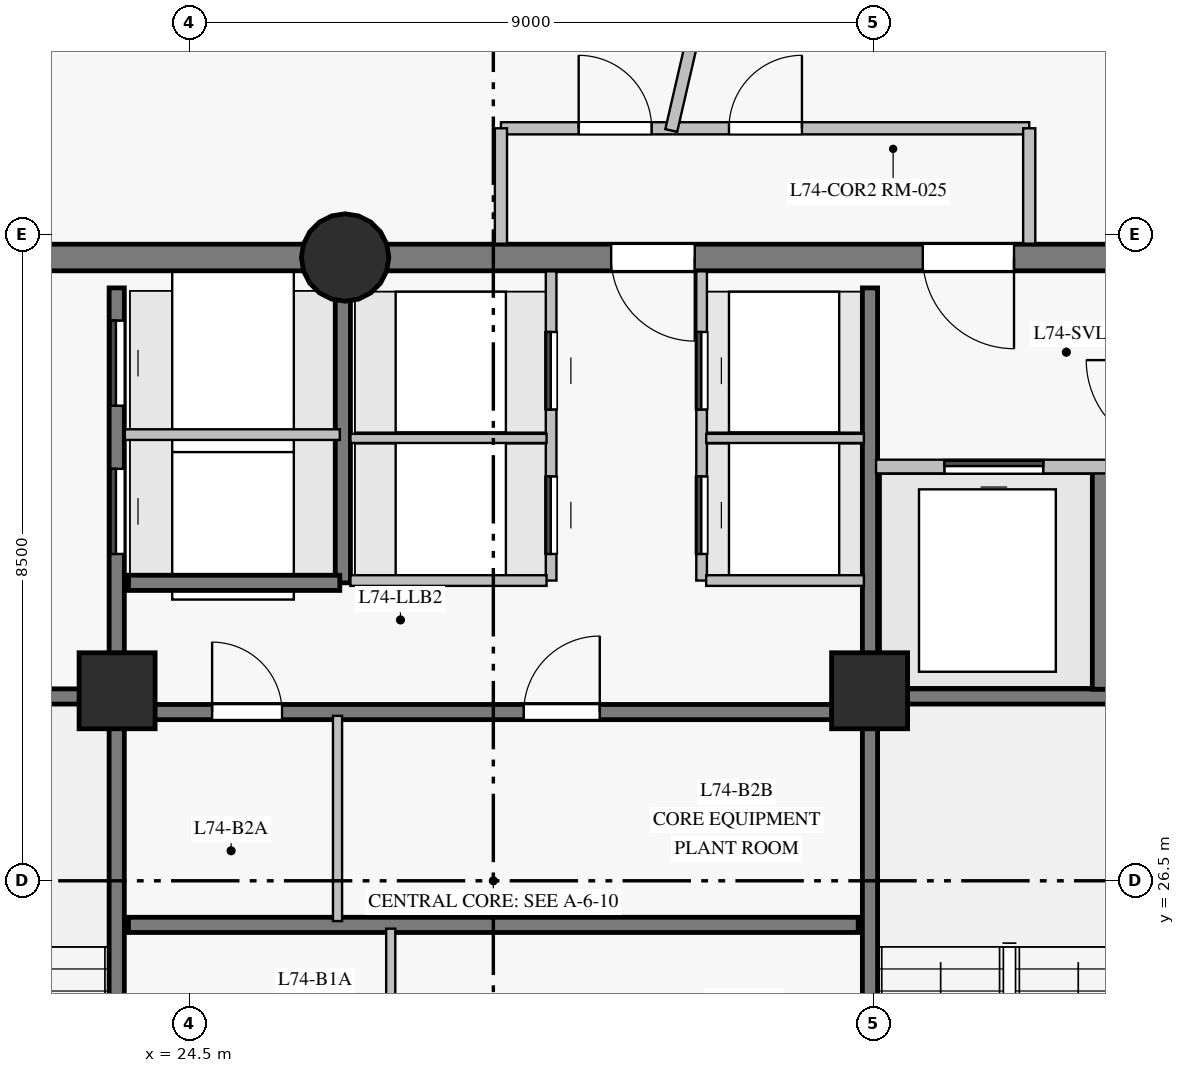
"""IFC4 building model, lengths in metres.
Left out: names, types, materials, properties, quantities, classifications, styles, units other than length and angle.
Written with IfcOpenShell. Run it as: python <this file> out.ifc"""

import sys

from ifc_helpers import new_model, si_unit, direction, frame, frame_2d, origin, origin_with_axes, origin_2d, place, context, subcontext, project, spatial, rectangle, circle, extrude, source, transform, mapped, element, fill, save


model = new_model("IFC4")
c1 = context("Model", 3, precision=1e-05, world=origin(), true_north=direction((0.0, 1.0)))
c2 = subcontext(c1, "Body", "Model", "MODEL_VIEW")
j1 = project(units=[si_unit("LENGTHUNIT", "METRE"), si_unit("PLANEANGLEUNIT", "RADIAN")], contexts=[c1])
p1 = place(None, origin())
s1 = spatial("IfcSite", under=j1, at=p1, CompositionType="ELEMENT")
p2 = place(p1, origin())
s2 = spatial("IfcBuilding", under=s1, at=p2, CompositionType="ELEMENT")
p3 = place(p2, frame((0.0, 0.0, 250.45)))
s3 = spatial("IfcBuildingStorey", under=s2, at=p3, CompositionType="ELEMENT", Elevation=250.45)
p4 = place(p3, frame((37.5, 34.7, 0.0), z_axis=(0.0, 0.0, 1.0), x_axis=(-1.0, 0.0, 0.0)))
e1 = element("IfcWall", 1, at=p4, inside=s3, PredefinedType="SHEAR", context=c2, shape_type="SweptSolid", body=[
    extrude(rectangle(XDim=10.95, YDim=0.35, at=frame_2d((5.475, 0.0))), origin(), (0.0, 0.0, 1.0), 2.85),
])
p5 = place(p4, frame((2.15, 0.0, 0.0)))
e2 = element("IfcOpeningElement", 2, at=p5, cuts=e1, PredefinedType="OPENING", context=c2, shape_type="SweptSolid", body=[
    extrude(rectangle(XDim=1.2, YDim=2.15, at=frame_2d((0.6, 1.075))), frame((0.0, 0.185, 0.0), z_axis=(0.0, -1.0, 0.0), x_axis=(1.0, 0.0, 0.0)), (0.0, 0.0, 1.0), 0.37),
])
p6 = place(p4, frame((6.35, 0.0, 0.0)))
e3 = element("IfcOpeningElement", 3, at=p6, cuts=e1, PredefinedType="OPENING", context=c2, shape_type="SweptSolid", body=[
    extrude(rectangle(XDim=1.1, YDim=2.15, at=frame_2d((0.55, 1.075))), frame((0.0, 0.185, 0.0), z_axis=(0.0, -1.0, 0.0), x_axis=(1.0, 0.0, 0.0)), (0.0, 0.0, 1.0), 0.37),
])
p7 = place(p3, frame((26.55, 34.7, 0.0), z_axis=(0.0, 0.0, 1.0), x_axis=(-1.0, 0.0, 0.0)))
e4 = element("IfcWall", 4, at=p7, inside=s3, PredefinedType="SHEAR", context=c2, shape_type="SweptSolid", body=[
    extrude(rectangle(XDim=7.05, YDim=0.35, at=frame_2d((3.525, 0.0))), origin(), (0.0, 0.0, 1.0), 2.85),
])
m1 = source(origin_with_axes(), c2, "Body", "SweptSolid", [
    extrude(circle(Radius=0.575, at=origin_2d()), origin(), (0.0, 0.0, 1.0), 3.05),
])
p8 = place(p3, frame((26.55, 34.7, 0.0), z_axis=(0.0, 0.0, 1.0), x_axis=(1.0, 0.0, 0.0)))
e5 = element("IfcColumn", 5, at=p8, inside=s3, PredefinedType="COLUMN", context=c2, shape_type="MappedRepresentation", body=[
    mapped(m1, transform((0.0, 0.0, 0.0), scale=1.0)),
])
m2 = source(origin_with_axes(), c2, "Body", "SweptSolid", [
    extrude(rectangle(XDim=1.0, YDim=1.0, at=origin_2d()), origin(), (0.0, 0.0, 1.0), 3.05),
])
for number, where, z_axis, x_axis in (
    (6, (23.55, 29.0, 0.0), (0.0, 0.0, 1.0), (1.0, 0.0, 0.0)),
    (7, (33.45, 29.0, 0.0), (0.0, 0.0, 1.0), (1.0, 0.0, 0.0)),
):
    element("IfcColumn", number, at=place(p3, frame(where, z_axis=z_axis, x_axis=x_axis)), inside=s3, PredefinedType="COLUMN", context=c2, shape_type="MappedRepresentation", body=[
        mapped(m2, transform((0.0, 0.0, 0.0), scale=1.0)),
    ])
p9 = place(p3, frame((23.545, 18.7, 0.0), z_axis=(0.0, 0.0, 1.0), x_axis=(0.0, 1.0, 0.0)))
e8 = element("IfcWall", 8, at=p9, inside=s3, PredefinedType="SHEAR", context=c2, shape_type="SweptSolid", body=[
    extrude(rectangle(XDim=15.6, YDim=0.2, at=frame_2d((7.8, 0.0))), origin(), (0.0, 0.0, 1.0), 2.85),
])
p10 = place(p9, frame((2.75, 0.0, 0.0)))
e9 = element("IfcOpeningElement", 9, at=p10, cuts=e8, PredefinedType="OPENING", context=c2, shape_type="SweptSolid", body=[
    extrude(rectangle(XDim=1.15, YDim=2.15, at=frame_2d((0.575, 1.075))), frame((0.0, 0.11, 0.0), z_axis=(0.0, -1.0, 0.0), x_axis=(1.0, 0.0, 0.0)), (0.0, 0.0, 1.0), 0.22),
])
p11 = place(p9, frame((0.14, 0.0, 0.0)))
e10 = element("IfcOpeningElement", 10, at=p11, cuts=e8, PredefinedType="OPENING", context=c2, shape_type="SweptSolid", body=[
    extrude(rectangle(XDim=0.88, YDim=2.1, at=frame_2d((0.44, 1.05))), frame((0.0, 0.11, 0.0), z_axis=(0.0, -1.0, 0.0), x_axis=(1.0, 0.0, 0.0)), (0.0, 0.0, 1.0), 0.22),
])
p12 = place(p9, frame((1.36, 0.0, 0.0)))
e11 = element("IfcOpeningElement", 11, at=p12, cuts=e8, PredefinedType="OPENING", context=c2, shape_type="SweptSolid", body=[
    extrude(rectangle(XDim=0.88, YDim=2.1, at=frame_2d((0.44, 1.05))), frame((0.0, 0.11, 0.0), z_axis=(0.0, -1.0, 0.0), x_axis=(1.0, 0.0, 0.0)), (0.0, 0.0, 1.0), 0.22),
])
p13 = place(p9, frame((12.1, 0.0, 0.0)))
e12 = element("IfcOpeningElement", 12, at=p13, cuts=e8, PredefinedType="OPENING", context=c2, shape_type="SweptSolid", body=[
    extrude(rectangle(XDim=1.12, YDim=2.15, at=frame_2d((0.56, 1.075))), frame((0.0, 0.11, 0.0), z_axis=(0.0, -1.0, 0.0), x_axis=(1.0, 0.0, 0.0)), (0.0, 0.0, 1.0), 0.22),
])
p14 = place(p9, frame((14.05, 0.0, 0.0)))
e13 = element("IfcOpeningElement", 13, at=p14, cuts=e8, PredefinedType="OPENING", context=c2, shape_type="SweptSolid", body=[
    extrude(rectangle(XDim=1.12, YDim=2.15, at=frame_2d((0.56, 1.075))), frame((0.0, 0.11, 0.0), z_axis=(0.0, -1.0, 0.0), x_axis=(1.0, 0.0, 0.0)), (0.0, 0.0, 1.0), 0.22),
])
p15 = place(p3, frame((33.455, 18.7, 0.0), z_axis=(0.0, 0.0, 1.0), x_axis=(0.0, 1.0, 0.0)))
e14 = element("IfcWall", 14, at=p15, inside=s3, PredefinedType="SHEAR", context=c2, shape_type="SweptSolid", body=[
    extrude(rectangle(XDim=15.6, YDim=0.2, at=frame_2d((7.8, 0.0))), origin(), (0.0, 0.0, 1.0), 2.85),
])
p16 = place(p15, frame((2.75, 0.0, 0.0)))
e15 = element("IfcOpeningElement", 15, at=p16, cuts=e14, PredefinedType="OPENING", context=c2, shape_type="SweptSolid", body=[
    extrude(rectangle(XDim=1.15, YDim=2.15, at=frame_2d((0.575, 1.075))), frame((0.0, 0.11, 0.0), z_axis=(0.0, -1.0, 0.0), x_axis=(1.0, 0.0, 0.0)), (0.0, 0.0, 1.0), 0.22),
])
p17 = place(p15, frame((0.55, 0.0, 0.0)))
e16 = element("IfcOpeningElement", 16, at=p17, cuts=e14, PredefinedType="OPENING", context=c2, shape_type="SweptSolid", body=[
    extrude(rectangle(XDim=0.94, YDim=2.1, at=frame_2d((0.47, 1.05))), frame((0.0, 0.11, 0.0), z_axis=(0.0, -1.0, 0.0), x_axis=(1.0, 0.0, 0.0)), (0.0, 0.0, 1.0), 0.22),
])
p18 = place(p3, frame((23.7, 25.92, 0.0), z_axis=(0.0, 0.0, 1.0), x_axis=(1.0, 0.0, 0.0)))
e17 = element("IfcWall", 17, at=p18, inside=s3, PredefinedType="SHEAR", context=c2, shape_type="SweptSolid", body=[
    extrude(rectangle(XDim=9.6, YDim=0.2, at=frame_2d((4.8, 0.0))), origin(), (0.0, 0.0, 1.0), 2.85),
])
p19 = place(p3, frame((23.7, 28.72, 0.0), z_axis=(0.0, 0.0, 1.0), x_axis=(1.0, 0.0, 0.0)))
e18 = element("IfcWall", 18, at=p19, inside=s3, PredefinedType="SHEAR", context=c2, shape_type="SweptSolid", body=[
    extrude(rectangle(XDim=9.6, YDim=0.2, at=frame_2d((4.8, 0.0))), origin(), (0.0, 0.0, 1.0), 2.85),
])
p20 = place(p19, frame((1.1, 0.0, 0.0)))
e19 = element("IfcOpeningElement", 19, at=p20, cuts=e18, PredefinedType="OPENING", context=c2, shape_type="SweptSolid", body=[
    extrude(rectangle(XDim=0.92, YDim=2.1, at=frame_2d((0.46, 1.05))), frame((0.0, 0.11, 0.0), z_axis=(0.0, -1.0, 0.0), x_axis=(1.0, 0.0, 0.0)), (0.0, 0.0, 1.0), 0.22),
])
p21 = place(p19, frame((5.2, 0.0, 0.0)))
e20 = element("IfcOpeningElement", 20, at=p21, cuts=e18, PredefinedType="OPENING", context=c2, shape_type="SweptSolid", body=[
    extrude(rectangle(XDim=1.0, YDim=2.15, at=frame_2d((0.5, 1.075))), frame((0.0, 0.11, 0.0), z_axis=(0.0, -1.0, 0.0), x_axis=(1.0, 0.0, 0.0)), (0.0, 0.0, 1.0), 0.22),
])
for number, where, z_axis, x_axis in (
    (21, (33.455, 28.925, 0.0), (0.0, 0.0, 1.0), (1.0, 0.0, 0.0)),
    (22, (19.55, 28.925, 0.0), (0.0, 0.0, 1.0), (1.0, 0.0, 0.0)),
):
    element("IfcWall", number, at=place(p3, frame(where, z_axis=z_axis, x_axis=x_axis)), inside=s3, PredefinedType="SHEAR", context=c2, shape_type="SweptSolid", body=[
        extrude(rectangle(XDim=3.995, YDim=0.2, at=frame_2d((1.998, 0.0))), origin(), (0.0, 0.0, 1.0), 2.85),
    ])
p22 = place(p3, frame((26.52, 30.42, 0.0), z_axis=(0.0, 0.0, 1.0), x_axis=(0.0, 1.0, 0.0)))
e23 = element("IfcWall", 23, at=p22, inside=s3, PredefinedType="SHEAR", context=c2, shape_type="SweptSolid", body=[
    extrude(rectangle(XDim=3.86, YDim=0.2, at=frame_2d((1.93, 0.0))), origin(), (0.0, 0.0, 1.0), 2.85),
])
p23 = place(p3, frame((36.48, 29.02, 0.0), z_axis=(0.0, 0.0, 1.0), x_axis=(0.0, 1.0, 0.0)))
e24 = element("IfcWall", 24, at=p23, inside=s3, PredefinedType="SHEAR", context=c2, shape_type="SweptSolid", body=[
    extrude(rectangle(XDim=2.86, YDim=0.2, at=frame_2d((1.43, 0.0))), origin(), (0.0, 0.0, 1.0), 2.85),
])
p24 = place(p3, frame((23.7, 30.42, 0.0), z_axis=(0.0, 0.0, 1.0), x_axis=(1.0, 0.0, 0.0)))
e25 = element("IfcWall", 25, at=p24, inside=s3, PredefinedType="SHEAR", context=c2, shape_type="SweptSolid", body=[
    extrude(rectangle(XDim=2.78, YDim=0.2, at=frame_2d((1.39, 0.0))), origin(), (0.0, 0.0, 1.0), 2.85),
])
p25 = place(p3, frame((28.6, 36.4, 0.0), z_axis=(0.0, 0.0, 1.0), x_axis=(1.0, 0.0, 0.0)))
e26 = element("IfcWall", 26, at=p25, inside=s3, PredefinedType="PARTITIONING", context=c2, shape_type="SweptSolid", body=[
    extrude(rectangle(XDim=6.95, YDim=0.16, at=frame_2d((3.475, 0.0))), origin(), (0.0, 0.0, 1.0), 2.45),
])
p26 = place(p25, frame((3.0, 0.0, 0.0)))
e27 = element("IfcOpeningElement", 27, at=p26, cuts=e26, PredefinedType="OPENING", context=c2, shape_type="SweptSolid", body=[
    extrude(rectangle(XDim=0.96, YDim=2.15, at=frame_2d((0.48, 1.075))), frame((0.0, 0.09, 0.0), z_axis=(0.0, -1.0, 0.0), x_axis=(1.0, 0.0, 0.0)), (0.0, 0.0, 1.0), 0.18),
])
p27 = place(p25, frame((1.022, 0.0, 0.0)))
e28 = element("IfcOpeningElement", 28, at=p27, cuts=e26, PredefinedType="OPENING", context=c2, shape_type="SweptSolid", body=[
    extrude(rectangle(XDim=0.96, YDim=2.15, at=frame_2d((0.48, 1.075))), frame((0.0, 0.09, 0.0), z_axis=(0.0, -1.0, 0.0), x_axis=(1.0, 0.0, 0.0)), (0.0, 0.0, 1.0), 0.18),
])
p28 = place(p3, frame((30.84, 36.371, 0.0), z_axis=(0.0, 0.0, 1.0), x_axis=(0.224990017286, 0.974361068661, 0.0)))
e29 = element("IfcWall", 29, at=p28, inside=s3, PredefinedType="PARTITIONING", context=c2, shape_type="SweptSolid", body=[
    extrude(rectangle(XDim=5.601, YDim=0.16, at=frame_2d((2.801, 0.0))), origin(), (0.0, 0.0, 1.0), 2.85),
])
p29 = place(p3, frame((29.26, 30.45, 0.0), z_axis=(0.0, 0.0, 1.0), x_axis=(0.0, 1.0, 0.0)))
e30 = element("IfcWall", 30, at=p29, inside=s3, PredefinedType="PARTITIONING", context=c2, shape_type="SweptSolid", body=[
    extrude(rectangle(XDim=4.068, YDim=0.14, at=frame_2d((2.034, 0.0))), origin(), (0.0, 0.0, 1.0), 2.85),
])
p30 = place(p29, frame((0.35, 0.0, 0.0)))
e31 = element("IfcOpeningElement", 31, at=p30, cuts=e30, PredefinedType="OPENING", context=c2, shape_type="SweptSolid", body=[
    extrude(rectangle(XDim=1.02, YDim=2.15, at=frame_2d((0.51, 1.075))), frame((0.0, 0.08, 0.0), z_axis=(0.0, -1.0, 0.0), x_axis=(1.0, 0.0, 0.0)), (0.0, 0.0, 1.0), 0.16),
])
p31 = place(p29, frame((2.25, 0.0, 0.0)))
e32 = element("IfcOpeningElement", 32, at=p31, cuts=e30, PredefinedType="OPENING", context=c2, shape_type="SweptSolid", body=[
    extrude(rectangle(XDim=1.02, YDim=2.15, at=frame_2d((0.51, 1.075))), frame((0.0, 0.08, 0.0), z_axis=(0.0, -1.0, 0.0), x_axis=(1.0, 0.0, 0.0)), (0.0, 0.0, 1.0), 0.16),
])
p32 = place(p3, frame((31.24, 30.45, 0.0), z_axis=(0.0, 0.0, 1.0), x_axis=(0.0, 1.0, 0.0)))
e33 = element("IfcWall", 33, at=p32, inside=s3, PredefinedType="PARTITIONING", context=c2, shape_type="SweptSolid", body=[
    extrude(rectangle(XDim=4.068, YDim=0.14, at=frame_2d((2.034, 0.0))), origin(), (0.0, 0.0, 1.0), 2.85),
])
p33 = place(p32, frame((0.35, 0.0, 0.0)))
e34 = element("IfcOpeningElement", 34, at=p33, cuts=e33, PredefinedType="OPENING", context=c2, shape_type="SweptSolid", body=[
    extrude(rectangle(XDim=1.02, YDim=2.15, at=frame_2d((0.51, 1.075))), frame((0.0, 0.08, 0.0), z_axis=(0.0, -1.0, 0.0), x_axis=(1.0, 0.0, 0.0)), (0.0, 0.0, 1.0), 0.16),
])
p34 = place(p32, frame((2.25, 0.0, 0.0)))
e35 = element("IfcOpeningElement", 35, at=p34, cuts=e33, PredefinedType="OPENING", context=c2, shape_type="SweptSolid", body=[
    extrude(rectangle(XDim=1.02, YDim=2.15, at=frame_2d((0.51, 1.075))), frame((0.0, 0.08, 0.0), z_axis=(0.0, -1.0, 0.0), x_axis=(1.0, 0.0, 0.0)), (0.0, 0.0, 1.0), 0.16),
])
p35 = place(p3, frame((33.535, 31.95, 0.0), z_axis=(0.0, 0.0, 1.0), x_axis=(1.0, 0.0, 0.0)))
e36 = element("IfcWall", 36, at=p35, inside=s3, PredefinedType="PARTITIONING", context=c2, shape_type="SweptSolid", body=[
    extrude(rectangle(XDim=3.784, YDim=0.18, at=frame_2d((1.892, 0.0))), origin(), (0.0, 0.0, 1.0), 2.85),
])
p36 = place(p35, frame((0.9, 0.0, 0.0)))
e37 = element("IfcOpeningElement", 37, at=p36, cuts=e36, PredefinedType="OPENING", context=c2, shape_type="SweptSolid", body=[
    extrude(rectangle(XDim=1.3, YDim=2.2, at=frame_2d((0.65, 1.1))), frame((0.0, 0.1, 0.0), z_axis=(0.0, -1.0, 0.0), x_axis=(1.0, 0.0, 0.0)), (0.0, 0.0, 1.0), 0.2),
])
p37 = place(p3, frame((23.652, 32.37, 0.0), z_axis=(0.0, 0.0, 1.0), x_axis=(1.0, 0.0, 0.0)))
e38 = element("IfcWall", 38, at=p37, inside=s3, PredefinedType="PARTITIONING", context=c2, shape_type="SweptSolid", body=[
    extrude(rectangle(XDim=2.828, YDim=0.14, at=frame_2d((1.414, 0.0))), origin(), (0.0, 0.0, 1.0), 2.85),
])
p38 = place(p3, frame((27.15, 23.17, 0.0), z_axis=(0.0, 0.0, 1.0), x_axis=(0.0, 1.0, 0.0)))
e39 = element("IfcWall", 39, at=p38, inside=s3, PredefinedType="PARTITIONING", context=c2, shape_type="SweptSolid", body=[
    extrude(rectangle(XDim=2.7, YDim=0.12, at=frame_2d((1.35, 0.0))), origin(), (0.0, 0.0, 1.0), 2.85),
])
p39 = place(p3, frame((26.45, 25.97, 0.0), z_axis=(0.0, 0.0, 1.0), x_axis=(0.0, 1.0, 0.0)))
e40 = element("IfcWall", 40, at=p39, inside=s3, PredefinedType="PARTITIONING", context=c2, shape_type="SweptSolid", body=[
    extrude(rectangle(XDim=2.7, YDim=0.12, at=frame_2d((1.35, 0.0))), origin(), (0.0, 0.0, 1.0), 2.85),
])
p40 = place(p3, frame((26.62, 30.45, 0.0), z_axis=(0.0, 0.0, 1.0), x_axis=(1.0, 0.0, 0.0)))
e41 = element("IfcWall", 41, at=p40, inside=s3, PredefinedType="PARTITIONING", context=c2, shape_type="SweptSolid", body=[
    extrude(rectangle(XDim=2.58, YDim=0.14, at=frame_2d((1.29, 0.0))), origin(), (0.0, 0.0, 1.0), 2.85),
])
p41 = place(p3, frame((26.62, 32.32, 0.0), z_axis=(0.0, 0.0, 1.0), x_axis=(1.0, 0.0, 0.0)))
e42 = element("IfcWall", 42, at=p41, inside=s3, PredefinedType="PARTITIONING", context=c2, shape_type="SweptSolid", body=[
    extrude(rectangle(XDim=2.58, YDim=0.12, at=frame_2d((1.29, 0.0))), origin(), (0.0, 0.0, 1.0), 2.85),
])
p42 = place(p3, frame((31.3, 30.45, 0.0), z_axis=(0.0, 0.0, 1.0), x_axis=(1.0, 0.0, 0.0)))
e43 = element("IfcWall", 43, at=p42, inside=s3, PredefinedType="PARTITIONING", context=c2, shape_type="SweptSolid", body=[
    extrude(rectangle(XDim=2.075, YDim=0.14, at=frame_2d((1.038, 0.0))), origin(), (0.0, 0.0, 1.0), 2.85),
])
p43 = place(p3, frame((31.3, 32.32, 0.0), z_axis=(0.0, 0.0, 1.0), x_axis=(1.0, 0.0, 0.0)))
e44 = element("IfcWall", 44, at=p43, inside=s3, PredefinedType="PARTITIONING", context=c2, shape_type="SweptSolid", body=[
    extrude(rectangle(XDim=2.075, YDim=0.12, at=frame_2d((1.038, 0.0))), origin(), (0.0, 0.0, 1.0), 2.85),
])
for number, where, z_axis, x_axis in (
    (45, (28.6, 34.882, 0.0), (0.0, 0.0, 1.0), (0.0, 1.0, 0.0)),
    (46, (35.55, 36.4, 0.0), (0.0, 0.0, 1.0), (0.0, -1.0, 0.0)),
):
    element("IfcWall", number, at=place(p3, frame(where, z_axis=z_axis, x_axis=x_axis)), inside=s3, PredefinedType="PARTITIONING", context=c2, shape_type="SweptSolid", body=[
        extrude(rectangle(XDim=1.518, YDim=0.16, at=frame_2d((0.759, 0.0))), origin(), (0.0, 0.0, 1.0), 2.85),
    ])
m3 = source(origin_with_axes(), c2, "Body", "SweptSolid", [
    extrude(rectangle(XDim=1.2, YDim=2.15, at=frame_2d((0.6, 1.075))), frame((0.0, 0.025, 0.0), z_axis=(0.0, -1.0, 0.0), x_axis=(1.0, 0.0, 0.0)), (0.0, 0.0, 1.0), 0.05),
])
p44 = place(p5, origin())
e47 = element("IfcDoor", 47, at=p44, inside=s3, OperationType="SINGLE_SWING_LEFT", PredefinedType="DOOR", context=c2, shape_type="MappedRepresentation", body=[
    mapped(m3, transform((0.0, 0.0, 0.0), scale=1.0)),
])
fill(e2, e47)
m4 = source(origin_with_axes(), c2, "Body", "SweptSolid", [
    extrude(rectangle(XDim=1.3, YDim=2.2, at=frame_2d((0.65, 1.1))), frame((0.0, 0.025, 0.0), z_axis=(0.0, -1.0, 0.0), x_axis=(1.0, 0.0, 0.0)), (0.0, 0.0, 1.0), 0.05),
])
p45 = place(p36, origin())
e48 = element("IfcDoor", 48, at=p45, inside=s3, OperationType="SLIDING_TO_LEFT", PredefinedType="DOOR", context=c2, shape_type="MappedRepresentation", body=[
    mapped(m4, transform((0.0, 0.0, 0.0), scale=1.0)),
])
fill(e37, e48)
m5 = source(origin_with_axes(), c2, "Body", "SweptSolid", [
    extrude(rectangle(XDim=0.92, YDim=2.1, at=frame_2d((0.46, 1.05))), frame((0.0, 0.025, 0.0), z_axis=(0.0, -1.0, 0.0), x_axis=(1.0, 0.0, 0.0)), (0.0, 0.0, 1.0), 0.05),
])
p46 = place(p20, origin())
e49 = element("IfcDoor", 49, at=p46, inside=s3, OperationType="SINGLE_SWING_LEFT", PredefinedType="DOOR", context=c2, shape_type="MappedRepresentation", body=[
    mapped(m5, transform((0.0, 0.0, 0.0), scale=1.0)),
])
fill(e19, e49)
m6 = source(origin_with_axes(), c2, "Body", "SweptSolid", [
    extrude(rectangle(XDim=1.0, YDim=2.15, at=frame_2d((0.5, 1.075))), frame((0.0, 0.025, 0.0), z_axis=(0.0, -1.0, 0.0), x_axis=(1.0, 0.0, 0.0)), (0.0, 0.0, 1.0), 0.05),
])
p47 = place(p21, origin())
e50 = element("IfcDoor", 50, at=p47, inside=s3, OperationType="SINGLE_SWING_RIGHT", PredefinedType="DOOR", context=c2, shape_type="MappedRepresentation", body=[
    mapped(m6, transform((0.0, 0.0, 0.0), scale=1.0)),
])
fill(e20, e50)
m7 = source(origin_with_axes(), c2, "Body", "SweptSolid", [
    extrude(rectangle(XDim=1.1, YDim=2.15, at=frame_2d((0.55, 1.075))), frame((0.0, 0.025, 0.0), z_axis=(0.0, -1.0, 0.0), x_axis=(1.0, 0.0, 0.0)), (0.0, 0.0, 1.0), 0.05),
])
p48 = place(p6, origin())
e51 = element("IfcDoor", 51, at=p48, inside=s3, OperationType="SINGLE_SWING_LEFT", PredefinedType="DOOR", context=c2, shape_type="MappedRepresentation", body=[
    mapped(m7, transform((0.0, 0.0, 0.0), scale=1.0)),
])
fill(e3, e51)
m8 = source(origin_with_axes(), c2, "Body", "SweptSolid", [
    extrude(rectangle(XDim=1.12, YDim=2.15, at=frame_2d((0.56, 1.075))), frame((0.0, 0.025, 0.0), z_axis=(0.0, -1.0, 0.0), x_axis=(1.0, 0.0, 0.0)), (0.0, 0.0, 1.0), 0.05),
])
p49 = place(p13, origin())
e52 = element("IfcDoor", 52, at=p49, inside=s3, OperationType="SLIDING_TO_LEFT", PredefinedType="DOOR", context=c2, shape_type="MappedRepresentation", body=[
    mapped(m8, transform((0.0, 0.0, 0.0), scale=1.0)),
])
fill(e12, e52)
p50 = place(p14, origin())
e53 = element("IfcDoor", 53, at=p50, inside=s3, OperationType="SLIDING_TO_RIGHT", PredefinedType="DOOR", context=c2, shape_type="MappedRepresentation", body=[
    mapped(m8, transform((0.0, 0.0, 0.0), scale=1.0)),
])
fill(e13, e53)
m9 = source(origin_with_axes(), c2, "Body", "SweptSolid", [
    extrude(rectangle(XDim=1.02, YDim=2.15, at=frame_2d((0.51, 1.075))), frame((0.0, 0.025, 0.0), z_axis=(0.0, -1.0, 0.0), x_axis=(1.0, 0.0, 0.0)), (0.0, 0.0, 1.0), 0.05),
])
p51 = place(p30, origin())
e54 = element("IfcDoor", 54, at=p51, inside=s3, OperationType="SLIDING_TO_LEFT", PredefinedType="DOOR", context=c2, shape_type="MappedRepresentation", body=[
    mapped(m9, transform((0.0, 0.0, 0.0), scale=1.0)),
])
fill(e31, e54)
p52 = place(p31, origin())
e55 = element("IfcDoor", 55, at=p52, inside=s3, OperationType="SLIDING_TO_LEFT", PredefinedType="DOOR", context=c2, shape_type="MappedRepresentation", body=[
    mapped(m9, transform((0.0, 0.0, 0.0), scale=1.0)),
])
fill(e32, e55)
p53 = place(p33, origin())
e56 = element("IfcDoor", 56, at=p53, inside=s3, OperationType="SLIDING_TO_LEFT", PredefinedType="DOOR", context=c2, shape_type="MappedRepresentation", body=[
    mapped(m9, transform((0.0, 0.0, 0.0), scale=1.0)),
])
fill(e34, e56)
p54 = place(p34, origin())
e57 = element("IfcDoor", 57, at=p54, inside=s3, OperationType="SLIDING_TO_LEFT", PredefinedType="DOOR", context=c2, shape_type="MappedRepresentation", body=[
    mapped(m9, transform((0.0, 0.0, 0.0), scale=1.0)),
])
fill(e35, e57)
m10 = source(origin_with_axes(), c2, "Body", "SweptSolid", [
    extrude(rectangle(XDim=0.96, YDim=2.15, at=frame_2d((0.48, 1.075))), frame((0.0, 0.025, 0.0), z_axis=(0.0, -1.0, 0.0), x_axis=(1.0, 0.0, 0.0)), (0.0, 0.0, 1.0), 0.05),
])
p55 = place(p26, origin())
e58 = element("IfcDoor", 58, at=p55, inside=s3, OperationType="SINGLE_SWING_RIGHT", PredefinedType="DOOR", context=c2, shape_type="MappedRepresentation", body=[
    mapped(m10, transform((0.0, 0.0, 0.0), scale=1.0)),
])
fill(e27, e58)
p56 = place(p27, origin())
e59 = element("IfcDoor", 59, at=p56, inside=s3, OperationType="SINGLE_SWING_LEFT", PredefinedType="DOOR", context=c2, shape_type="MappedRepresentation", body=[
    mapped(m10, transform((0.0, 0.0, 0.0), scale=1.0)),
])
fill(e28, e59)
save(model, sys.argv[1])
